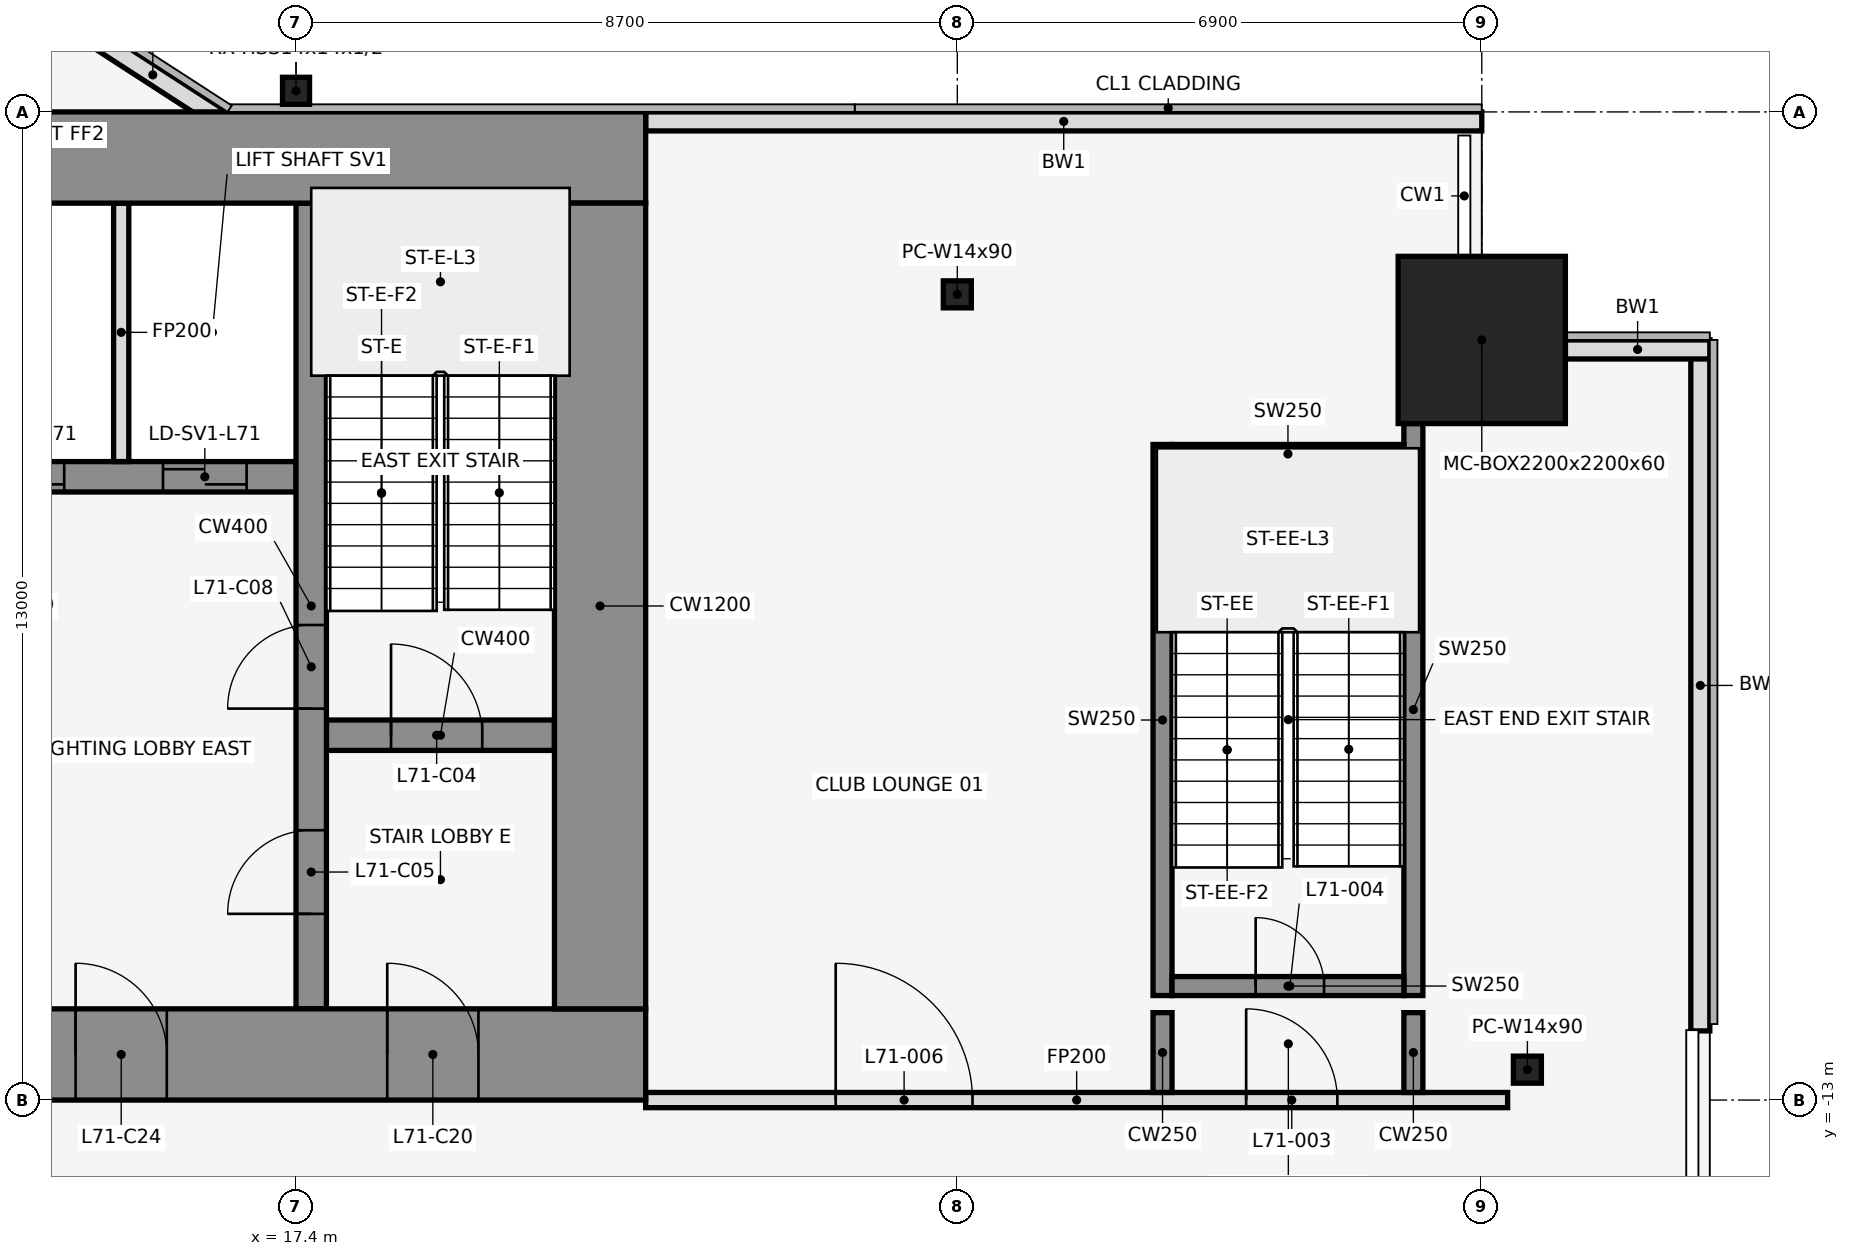
"""IFC4 building model, lengths in metres.
Left out: names, types, materials, properties, quantities, classifications, styles, units other than length and angle.
Written with IfcOpenShell. Run it as: python <this file> out.ifc"""

import sys

from ifc_helpers import new_model, si_unit, direction, frame, frame_2d, origin, origin_2d, place, context, subcontext, project, spatial, rectangle, hollow_rectangle, i_section, extrude, element, fill, save


model = new_model("IFC4")
c1 = context("Model", 3, precision=1e-05, world=origin(), true_north=direction((0.0, 1.0)))
c2 = subcontext(c1, "Body", "Model", "MODEL_VIEW")
j1 = project(units=[si_unit("LENGTHUNIT", "METRE"), si_unit("PLANEANGLEUNIT", "RADIAN")], contexts=[c1])
p1 = place(None, origin())
s1 = spatial("IfcSite", under=j1, at=p1, CompositionType="ELEMENT")
p2 = place(p1, origin())
s2 = spatial("IfcBuilding", under=s1, at=p2, CompositionType="ELEMENT")
p3 = place(p2, frame((0.0, 0.0, 315.5)))
s3 = spatial("IfcBuildingStorey", under=s2, at=p3, CompositionType="ELEMENT", Elevation=315.5)
p4 = place(p3, frame((26.1, -2.4, 0.0), z_axis=(0.0, 0.0, 1.0), x_axis=(1.0, 0.0, 0.0)))
e1 = element("IfcColumn", 1, at=p4, inside=s3, PredefinedType="COLUMN", context=c2, shape_type="SweptSolid", body=[
    extrude(i_section(OverallWidth=0.368, OverallDepth=0.356, WebThickness=0.011, FlangeThickness=0.018, at=origin_2d()), origin(), (0.0, 0.0, 1.0), 4.5),
])
p5 = place(p3, frame((33.0, -3.0, 0.0), z_axis=(0.0, 0.0, 1.0), x_axis=(1.0, 0.0, 0.0)))
e2 = element("IfcColumn", 2, at=p5, inside=s3, PredefinedType="COLUMN", context=c2, shape_type="SweptSolid", body=[
    extrude(hollow_rectangle(XDim=2.2, YDim=2.2, WallThickness=0.06, at=origin_2d()), origin(), (0.0, 0.0, 1.0), 4.5),
])
p6 = place(p3, frame((17.4, 0.278, 0.0), z_axis=(0.0, 0.0, 1.0), x_axis=(1.0, 0.0, 0.0)))
e3 = element("IfcColumn", 3, at=p6, inside=s3, PredefinedType="COLUMN", context=c2, shape_type="SweptSolid", body=[
    extrude(hollow_rectangle(XDim=0.356, YDim=0.356, WallThickness=0.012, at=origin_2d()), origin(), (0.0, 0.0, 1.0), 4.5),
])
p7 = place(p3, frame((33.6, -12.6, 0.0), z_axis=(0.0, 0.0, 1.0), x_axis=(1.0, 0.0, 0.0)))
e4 = element("IfcColumn", 4, at=p7, inside=s3, PredefinedType="COLUMN", context=c2, shape_type="SweptSolid", body=[
    extrude(i_section(OverallWidth=0.368, OverallDepth=0.356, WebThickness=0.011, FlangeThickness=0.018, at=origin_2d()), origin(), (0.0, 0.0, 1.0), 4.5),
])
p8 = place(p3, frame((33.0, -0.125, 0.0), z_axis=(0.0, 0.0, 1.0), x_axis=(-1.0, 0.0, 0.0)))
e5 = element("IfcWall", 5, at=p8, inside=s3, PredefinedType="STANDARD", context=c2, shape_type="SweptSolid", body=[
    extrude(rectangle(XDim=11.0, YDim=0.25, at=frame_2d((5.5, 0.0))), origin(), (0.0, 0.0, 1.0), 4.35),
])
p9 = place(p3, frame((16.432, -0.105, 0.0), z_axis=(0.0, 0.0, 1.0), x_axis=(-0.83981312244, 0.542875602121, 0.0)))
e6 = element("IfcWall", 6, at=p9, inside=s3, PredefinedType="STANDARD", context=c2, shape_type="SweptSolid", body=[
    extrude(rectangle(XDim=2.183, YDim=0.25, at=frame_2d((1.091, 0.0))), origin(), (0.0, 0.0, 1.0), 4.35),
])
p10 = place(p3, frame((35.875, -12.09, 0.0), z_axis=(0.0, 0.0, 1.0), x_axis=(0.0, 1.0, 0.0)))
e7 = element("IfcWall", 7, at=p10, inside=s3, PredefinedType="STANDARD", context=c2, shape_type="SweptSolid", body=[
    extrude(rectangle(XDim=9.09, YDim=0.25, at=frame_2d((4.545, 0.0))), origin(), (0.0, 0.0, 1.0), 4.35),
])
p11 = place(p3, frame((36.0, -3.125, 0.0), z_axis=(0.0, 0.0, 1.0), x_axis=(-1.0, 0.0, 0.0)))
e8 = element("IfcWall", 8, at=p11, inside=s3, PredefinedType="STANDARD", context=c2, shape_type="SweptSolid", body=[
    extrude(rectangle(XDim=1.9, YDim=0.25, at=frame_2d((0.95, 0.0))), origin(), (0.0, 0.0, 1.0), 4.35),
])
p12 = place(p3, frame((28.8, -11.625, 0.0), z_axis=(0.0, 0.0, 1.0), x_axis=(0.0, 1.0, 0.0)))
e9 = element("IfcWall", 9, at=p12, inside=s3, PredefinedType="SHEAR", context=c2, shape_type="SweptSolid", body=[
    extrude(rectangle(XDim=7.25, YDim=0.25, at=frame_2d((3.625, 0.0))), origin(), (0.0, 0.0, 1.0), 4.5),
])
p13 = place(p3, frame((32.1, -11.625, 0.0), z_axis=(0.0, 0.0, 1.0), x_axis=(0.0, 1.0, 0.0)))
e10 = element("IfcWall", 10, at=p13, inside=s3, PredefinedType="SHEAR", context=c2, shape_type="SweptSolid", body=[
    extrude(rectangle(XDim=7.525, YDim=0.25, at=frame_2d((3.762, 0.0))), origin(), (0.0, 0.0, 1.0), 4.5),
])
p14 = place(p3, frame((28.925, -11.5, 0.0), z_axis=(0.0, 0.0, 1.0), x_axis=(1.0, 0.0, 0.0)))
e11 = element("IfcWall", 11, at=p14, inside=s3, PredefinedType="SHEAR", context=c2, shape_type="SweptSolid", body=[
    extrude(rectangle(XDim=3.05, YDim=0.25, at=frame_2d((1.525, 0.0))), origin(), (0.0, 0.0, 1.0), 4.5),
])
p15 = place(p14, frame((1.1, 0.0, 0.0)))
e12 = element("IfcOpeningElement", 12, at=p15, cuts=e11, PredefinedType="OPENING", context=c2, shape_type="SweptSolid", body=[
    extrude(rectangle(XDim=0.9, YDim=2.1, at=frame_2d((0.45, 1.05))), frame((0.0, 0.137, 0.0), z_axis=(0.0, -1.0, 0.0), x_axis=(1.0, 0.0, 0.0)), (0.0, 0.0, 1.0), 0.274),
])
p16 = place(p3, frame((28.925, -4.5, 0.0), z_axis=(0.0, 0.0, 1.0), x_axis=(1.0, 0.0, 0.0)))
e13 = element("IfcWall", 13, at=p16, inside=s3, PredefinedType="SHEAR", context=c2, shape_type="SweptSolid", body=[
    extrude(rectangle(XDim=3.05, YDim=0.25, at=frame_2d((1.525, 0.0))), origin(), (0.0, 0.0, 1.0), 4.5),
])
p17 = place(p3, frame((22.0, -13.0, 0.0), z_axis=(0.0, 0.0, 1.0), x_axis=(1.0, 0.0, 0.0)))
e14 = element("IfcWall", 14, at=p17, inside=s3, PredefinedType="PARTITIONING", context=c2, shape_type="SweptSolid", body=[
    extrude(rectangle(XDim=11.34, YDim=0.2, at=frame_2d((5.67, 0.0))), origin(), (0.0, 0.0, 1.0), 3.418),
])
p18 = place(p17, frame((7.9, 0.0, 0.0)))
e15 = element("IfcOpeningElement", 15, at=p18, cuts=e14, PredefinedType="OPENING", context=c2, shape_type="SweptSolid", body=[
    extrude(rectangle(XDim=1.2, YDim=2.1, at=frame_2d((0.6, 1.05))), frame((0.0, 0.112, 0.0), z_axis=(0.0, -1.0, 0.0), x_axis=(1.0, 0.0, 0.0)), (0.0, 0.0, 1.0), 0.224),
])
p19 = place(p17, frame((2.5, 0.0, 0.0)))
e16 = element("IfcOpeningElement", 16, at=p19, cuts=e14, PredefinedType="OPENING", context=c2, shape_type="SweptSolid", body=[
    extrude(rectangle(XDim=1.8, YDim=2.1, at=frame_2d((0.9, 1.05))), frame((0.0, 0.112, 0.0), z_axis=(0.0, -1.0, 0.0), x_axis=(1.0, 0.0, 0.0)), (0.0, 0.0, 1.0), 0.224),
])
for number, where, z_axis, x_axis in (
    (17, (28.8, -12.9, 0.0), (0.0, 0.0, 1.0), (0.0, 1.0, 0.0)),
    (18, (32.1, -12.9, 0.0), (0.0, 0.0, 1.0), (0.0, 1.0, 0.0)),
):
    element("IfcWall", number, at=place(p3, frame(where, z_axis=z_axis, x_axis=x_axis)), inside=s3, PredefinedType="SHEAR", context=c2, shape_type="SweptSolid", body=[
        extrude(rectangle(XDim=1.05, YDim=0.25, at=frame_2d((0.525, 0.0))), origin(), (0.0, 0.0, 1.0), 4.5),
    ])
p20 = place(p3, frame((17.8, -8.2, 0.0), z_axis=(0.0, 0.0, 1.0), x_axis=(1.0, 0.0, 0.0)))
e19 = element("IfcWall", 19, at=p20, inside=s3, PredefinedType="SHEAR", context=c2, shape_type="SweptSolid", body=[
    extrude(rectangle(XDim=3.0, YDim=0.4, at=frame_2d((1.5, 0.0))), origin(), (0.0, 0.0, 1.0), 4.5),
])
p21 = place(p20, frame((0.85, 0.0, 0.0)))
e20 = element("IfcOpeningElement", 20, at=p21, cuts=e19, PredefinedType="OPENING", context=c2, shape_type="SweptSolid", body=[
    extrude(rectangle(XDim=1.2, YDim=2.1, at=frame_2d((0.6, 1.05))), frame((0.0, 0.212, 0.0), z_axis=(0.0, -1.0, 0.0), x_axis=(1.0, 0.0, 0.0)), (0.0, 0.0, 1.0), 0.424),
])
p22 = place(p3, frame((3.8, -4.8, 0.0), z_axis=(0.0, 0.0, 1.0), x_axis=(1.0, 0.0, 0.0)))
e21 = element("IfcWall", 21, at=p22, inside=s3, PredefinedType="SHEAR", context=c2, shape_type="SweptSolid", body=[
    extrude(rectangle(XDim=13.6, YDim=0.4, at=frame_2d((6.8, 0.0))), origin(), (0.0, 0.0, 1.0), 4.5),
])
p23 = place(p22, frame((0.75, 0.0, 0.0)))
e22 = element("IfcOpeningElement", 22, at=p23, cuts=e21, PredefinedType="OPENING", context=c2, shape_type="SweptSolid", body=[
    extrude(rectangle(XDim=1.2, YDim=2.1, at=frame_2d((0.6, 1.05))), frame((0.0, 0.212, 0.0), z_axis=(0.0, -1.0, 0.0), x_axis=(1.0, 0.0, 0.0)), (0.0, 0.0, 1.0), 0.424),
])
p24 = place(p22, frame((3.65, 0.0, 0.0)))
e23 = element("IfcOpeningElement", 23, at=p24, cuts=e21, PredefinedType="OPENING", context=c2, shape_type="SweptSolid", body=[
    extrude(rectangle(XDim=1.2, YDim=2.1, at=frame_2d((0.6, 1.05))), frame((0.0, 0.212, 0.0), z_axis=(0.0, -1.0, 0.0), x_axis=(1.0, 0.0, 0.0)), (0.0, 0.0, 1.0), 0.424),
])
p25 = place(p22, frame((6.65, 0.0, 0.0)))
e24 = element("IfcOpeningElement", 24, at=p25, cuts=e21, PredefinedType="OPENING", context=c2, shape_type="SweptSolid", body=[
    extrude(rectangle(XDim=1.2, YDim=2.1, at=frame_2d((0.6, 1.05))), frame((0.0, 0.212, 0.0), z_axis=(0.0, -1.0, 0.0), x_axis=(1.0, 0.0, 0.0)), (0.0, 0.0, 1.0), 0.424),
])
p26 = place(p22, frame((9.45, 0.0, 0.0)))
e25 = element("IfcOpeningElement", 25, at=p26, cuts=e21, PredefinedType="OPENING", context=c2, shape_type="SweptSolid", body=[
    extrude(rectangle(XDim=1.1, YDim=2.1, at=frame_2d((0.55, 1.05))), frame((0.0, 0.212, 0.0), z_axis=(0.0, -1.0, 0.0), x_axis=(1.0, 0.0, 0.0)), (0.0, 0.0, 1.0), 0.424),
])
p27 = place(p22, frame((11.85, 0.0, 0.0)))
e26 = element("IfcOpeningElement", 26, at=p27, cuts=e21, PredefinedType="OPENING", context=c2, shape_type="SweptSolid", body=[
    extrude(rectangle(XDim=1.1, YDim=2.1, at=frame_2d((0.55, 1.05))), frame((0.0, 0.212, 0.0), z_axis=(0.0, -1.0, 0.0), x_axis=(1.0, 0.0, 0.0)), (0.0, 0.0, 1.0), 0.424),
])
p28 = place(p3, frame((15.1, -4.6, 0.0), z_axis=(0.0, 0.0, 1.0), x_axis=(0.0, 1.0, 0.0)))
e27 = element("IfcWall", 27, at=p28, inside=s3, PredefinedType="PARTITIONING", context=c2, shape_type="SweptSolid", body=[
    extrude(rectangle(XDim=3.4, YDim=0.2, at=frame_2d((1.7, 0.0))), origin(), (0.0, 0.0, 1.0), 3.418),
])
p29 = place(p3, frame((17.6, -11.8, 0.0), z_axis=(0.0, 0.0, 1.0), x_axis=(0.0, 1.0, 0.0)))
e28 = element("IfcWall", 28, at=p29, inside=s3, PredefinedType="SHEAR", context=c2, shape_type="SweptSolid", body=[
    extrude(rectangle(XDim=10.6, YDim=0.4, at=frame_2d((5.3, 0.0))), origin(), (0.0, 0.0, 1.0), 4.5),
])
p30 = place(p29, frame((1.25, 0.0, 0.0)))
e29 = element("IfcOpeningElement", 29, at=p30, cuts=e28, PredefinedType="OPENING", context=c2, shape_type="SweptSolid", body=[
    extrude(rectangle(XDim=1.1, YDim=2.1, at=frame_2d((0.55, 1.05))), frame((0.0, 0.212, 0.0), z_axis=(0.0, -1.0, 0.0), x_axis=(1.0, 0.0, 0.0)), (0.0, 0.0, 1.0), 0.424),
])
p31 = place(p29, frame((3.95, 0.0, 0.0)))
e30 = element("IfcOpeningElement", 30, at=p31, cuts=e28, PredefinedType="OPENING", context=c2, shape_type="SweptSolid", body=[
    extrude(rectangle(XDim=1.1, YDim=2.1, at=frame_2d((0.55, 1.05))), frame((0.0, 0.212, 0.0), z_axis=(0.0, -1.0, 0.0), x_axis=(1.0, 0.0, 0.0)), (0.0, 0.0, 1.0), 0.424),
])
p32 = place(p3, frame((-22.0, -0.6, 0.0), z_axis=(0.0, 0.0, 1.0), x_axis=(1.0, 0.0, 0.0)))
e31 = element("IfcWall", 31, at=p32, inside=s3, PredefinedType="SHEAR", context=c2, shape_type="SweptSolid", body=[
    extrude(rectangle(XDim=44.0, YDim=1.2, at=frame_2d((22.0, 0.0))), origin(), (0.0, 0.0, 1.0), 4.5),
])
p33 = place(p32, frame((18.55, 0.0, 0.0)))
e32 = element("IfcOpeningElement", 32, at=p33, cuts=e31, PredefinedType="OPENING", context=c2, shape_type="SweptSolid", body=[
    extrude(rectangle(XDim=0.9, YDim=2.1, at=frame_2d((0.45, 1.05))), frame((0.0, 0.612, 0.0), z_axis=(0.0, -1.0, 0.0), x_axis=(1.0, 0.0, 0.0)), (0.0, 0.0, 1.0), 1.224),
])
p34 = place(p32, frame((24.55, 0.0, 0.0)))
e33 = element("IfcOpeningElement", 33, at=p34, cuts=e31, PredefinedType="OPENING", context=c2, shape_type="SweptSolid", body=[
    extrude(rectangle(XDim=0.9, YDim=2.1, at=frame_2d((0.45, 1.05))), frame((0.0, 0.612, 0.0), z_axis=(0.0, -1.0, 0.0), x_axis=(1.0, 0.0, 0.0)), (0.0, 0.0, 1.0), 1.224),
])
p35 = place(p3, frame((-22.0, -12.4, 0.0), z_axis=(0.0, 0.0, 1.0), x_axis=(1.0, 0.0, 0.0)))
e34 = element("IfcWall", 34, at=p35, inside=s3, PredefinedType="SHEAR", context=c2, shape_type="SweptSolid", body=[
    extrude(rectangle(XDim=44.0, YDim=1.2, at=frame_2d((22.0, 0.0))), origin(), (0.0, 0.0, 1.0), 4.5),
])
p36 = place(p35, frame((2.2, 0.0, 0.0)))
e35 = element("IfcOpeningElement", 35, at=p36, cuts=e34, PredefinedType="OPENING", context=c2, shape_type="SweptSolid", body=[
    extrude(rectangle(XDim=1.2, YDim=2.1, at=frame_2d((0.6, 1.05))), frame((0.0, 0.612, 0.0), z_axis=(0.0, -1.0, 0.0), x_axis=(1.0, 0.0, 0.0)), (0.0, 0.0, 1.0), 1.224),
])
p37 = place(p35, frame((21.4, 0.0, 0.0)))
e36 = element("IfcOpeningElement", 36, at=p37, cuts=e34, PredefinedType="OPENING", context=c2, shape_type="SweptSolid", body=[
    extrude(rectangle(XDim=1.2, YDim=2.1, at=frame_2d((0.6, 1.05))), frame((0.0, 0.612, 0.0), z_axis=(0.0, -1.0, 0.0), x_axis=(1.0, 0.0, 0.0)), (0.0, 0.0, 1.0), 1.224),
])
p38 = place(p35, frame((40.6, 0.0, 0.0)))
e37 = element("IfcOpeningElement", 37, at=p38, cuts=e34, PredefinedType="OPENING", context=c2, shape_type="SweptSolid", body=[
    extrude(rectangle(XDim=1.2, YDim=2.1, at=frame_2d((0.6, 1.05))), frame((0.0, 0.612, 0.0), z_axis=(0.0, -1.0, 0.0), x_axis=(1.0, 0.0, 0.0)), (0.0, 0.0, 1.0), 1.224),
])
p39 = place(p35, frame((16.0, 0.0, 0.0)))
e38 = element("IfcOpeningElement", 38, at=p39, cuts=e34, PredefinedType="OPENING", context=c2, shape_type="SweptSolid", body=[
    extrude(rectangle(XDim=1.8, YDim=2.1, at=frame_2d((0.9, 1.05))), frame((0.0, 0.612, 0.0), z_axis=(0.0, -1.0, 0.0), x_axis=(1.0, 0.0, 0.0)), (0.0, 0.0, 1.0), 1.224),
])
p40 = place(p35, frame((6.3, 0.0, 0.0)))
e39 = element("IfcOpeningElement", 39, at=p40, cuts=e34, PredefinedType="OPENING", context=c2, shape_type="SweptSolid", body=[
    extrude(rectangle(XDim=1.2, YDim=2.1, at=frame_2d((0.6, 1.05))), frame((0.0, 0.612, 0.0), z_axis=(0.0, -1.0, 0.0), x_axis=(1.0, 0.0, 0.0)), (0.0, 0.0, 1.0), 1.224),
])
p41 = place(p35, frame((26.2, 0.0, 0.0)))
e40 = element("IfcOpeningElement", 40, at=p41, cuts=e34, PredefinedType="OPENING", context=c2, shape_type="SweptSolid", body=[
    extrude(rectangle(XDim=1.8, YDim=2.1, at=frame_2d((0.9, 1.05))), frame((0.0, 0.612, 0.0), z_axis=(0.0, -1.0, 0.0), x_axis=(1.0, 0.0, 0.0)), (0.0, 0.0, 1.0), 1.224),
])
p42 = place(p35, frame((36.5, 0.0, 0.0)))
e41 = element("IfcOpeningElement", 41, at=p42, cuts=e34, PredefinedType="OPENING", context=c2, shape_type="SweptSolid", body=[
    extrude(rectangle(XDim=1.2, YDim=2.1, at=frame_2d((0.6, 1.05))), frame((0.0, 0.612, 0.0), z_axis=(0.0, -1.0, 0.0), x_axis=(1.0, 0.0, 0.0)), (0.0, 0.0, 1.0), 1.224),
])
p43 = place(p3, frame((21.4, -11.8, 0.0), z_axis=(0.0, 0.0, 1.0), x_axis=(0.0, 1.0, 0.0)))
e42 = element("IfcWall", 42, at=p43, inside=s3, PredefinedType="SHEAR", context=c2, shape_type="SweptSolid", body=[
    extrude(rectangle(XDim=10.6, YDim=1.2, at=frame_2d((5.3, 0.0))), origin(), (0.0, 0.0, 1.0), 4.5),
])
p44 = place(p18, origin())
e43 = element("IfcDoor", 43, at=p44, inside=s3, OperationType="SINGLE_SWING_RIGHT", PredefinedType="DOOR", context=c2, shape_type="SweptSolid", body=[
    extrude(rectangle(XDim=1.2, YDim=2.1, at=frame_2d((0.6, 1.05))), frame((0.0, 0.025, 0.0), z_axis=(0.0, -1.0, 0.0), x_axis=(1.0, 0.0, 0.0)), (0.0, 0.0, 1.0), 0.05),
])
fill(e15, e43)
p45 = place(p15, origin())
e44 = element("IfcDoor", 44, at=p45, inside=s3, OperationType="SINGLE_SWING_LEFT", PredefinedType="DOOR", context=c2, shape_type="SweptSolid", body=[
    extrude(rectangle(XDim=0.9, YDim=2.1, at=frame_2d((0.45, 1.05))), frame((0.0, 0.025, 0.0), z_axis=(0.0, -1.0, 0.0), x_axis=(1.0, 0.0, 0.0)), (0.0, 0.0, 1.0), 0.05),
])
fill(e12, e44)
p46 = place(p19, origin())
e45 = element("IfcDoor", 45, at=p46, inside=s3, OperationType="SINGLE_SWING_LEFT", PredefinedType="DOOR", context=c2, shape_type="SweptSolid", body=[
    extrude(rectangle(XDim=1.8, YDim=2.1, at=frame_2d((0.9, 1.05))), frame((0.0, 0.025, 0.0), z_axis=(0.0, -1.0, 0.0), x_axis=(1.0, 0.0, 0.0)), (0.0, 0.0, 1.0), 0.05),
])
fill(e16, e45)
p47 = place(p21, origin())
e46 = element("IfcDoor", 46, at=p47, inside=s3, OperationType="SINGLE_SWING_RIGHT", PredefinedType="DOOR", context=c2, shape_type="SweptSolid", body=[
    extrude(rectangle(XDim=1.2, YDim=2.1, at=frame_2d((0.6, 1.05))), frame((0.0, 0.025, 0.0), z_axis=(0.0, -1.0, 0.0), x_axis=(1.0, 0.0, 0.0)), (0.0, 0.0, 1.0), 0.05),
])
fill(e20, e46)
p48 = place(p30, origin())
e47 = element("IfcDoor", 47, at=p48, inside=s3, OperationType="SINGLE_SWING_LEFT", PredefinedType="DOOR", context=c2, shape_type="SweptSolid", body=[
    extrude(rectangle(XDim=1.1, YDim=2.1, at=frame_2d((0.55, 1.05))), frame((0.0, 0.025, 0.0), z_axis=(0.0, -1.0, 0.0), x_axis=(1.0, 0.0, 0.0)), (0.0, 0.0, 1.0), 0.05),
])
fill(e29, e47)
p49 = place(p26, origin())
e48 = element("IfcDoor", 48, at=p49, inside=s3, OperationType="DOUBLE_DOOR_SLIDING", PredefinedType="DOOR", context=c2, shape_type="SweptSolid", body=[
    extrude(rectangle(XDim=1.1, YDim=2.1, at=frame_2d((0.55, 1.05))), frame((0.0, 0.025, 0.0), z_axis=(0.0, -1.0, 0.0), x_axis=(1.0, 0.0, 0.0)), (0.0, 0.0, 1.0), 0.05),
])
fill(e25, e48)
p50 = place(p27, origin())
e49 = element("IfcDoor", 49, at=p50, inside=s3, OperationType="DOUBLE_DOOR_SLIDING", PredefinedType="DOOR", context=c2, shape_type="SweptSolid", body=[
    extrude(rectangle(XDim=1.1, YDim=2.1, at=frame_2d((0.55, 1.05))), frame((0.0, 0.025, 0.0), z_axis=(0.0, -1.0, 0.0), x_axis=(1.0, 0.0, 0.0)), (0.0, 0.0, 1.0), 0.05),
])
fill(e26, e49)
p51 = place(p31, origin())
e50 = element("IfcDoor", 50, at=p51, inside=s3, OperationType="SINGLE_SWING_RIGHT", PredefinedType="DOOR", context=c2, shape_type="SweptSolid", body=[
    extrude(rectangle(XDim=1.1, YDim=2.1, at=frame_2d((0.55, 1.05))), frame((0.0, 0.025, 0.0), z_axis=(0.0, -1.0, 0.0), x_axis=(1.0, 0.0, 0.0)), (0.0, 0.0, 1.0), 0.05),
])
fill(e30, e50)
p52 = place(p38, frame((1.2, 0.0, 0.0), z_axis=(0.0, 0.0, 1.0), x_axis=(-1.0, 0.0, 0.0)))
e51 = element("IfcDoor", 51, at=p52, inside=s3, OperationType="SINGLE_SWING_RIGHT", PredefinedType="DOOR", context=c2, shape_type="SweptSolid", body=[
    extrude(rectangle(XDim=1.2, YDim=2.1, at=frame_2d((0.6, 1.05))), frame((0.0, 0.025, 0.0), z_axis=(0.0, -1.0, 0.0), x_axis=(1.0, 0.0, 0.0)), (0.0, 0.0, 1.0), 0.05),
])
fill(e37, e51)
p53 = place(p42, frame((1.2, 0.0, 0.0), z_axis=(0.0, 0.0, 1.0), x_axis=(-1.0, 0.0, 0.0)))
e52 = element("IfcDoor", 52, at=p53, inside=s3, OperationType="SINGLE_SWING_RIGHT", PredefinedType="DOOR", context=c2, shape_type="SweptSolid", body=[
    extrude(rectangle(XDim=1.2, YDim=2.1, at=frame_2d((0.6, 1.05))), frame((0.0, 0.025, 0.0), z_axis=(0.0, -1.0, 0.0), x_axis=(1.0, 0.0, 0.0)), (0.0, 0.0, 1.0), 0.05),
])
fill(e41, e52)
save(model, sys.argv[1])
